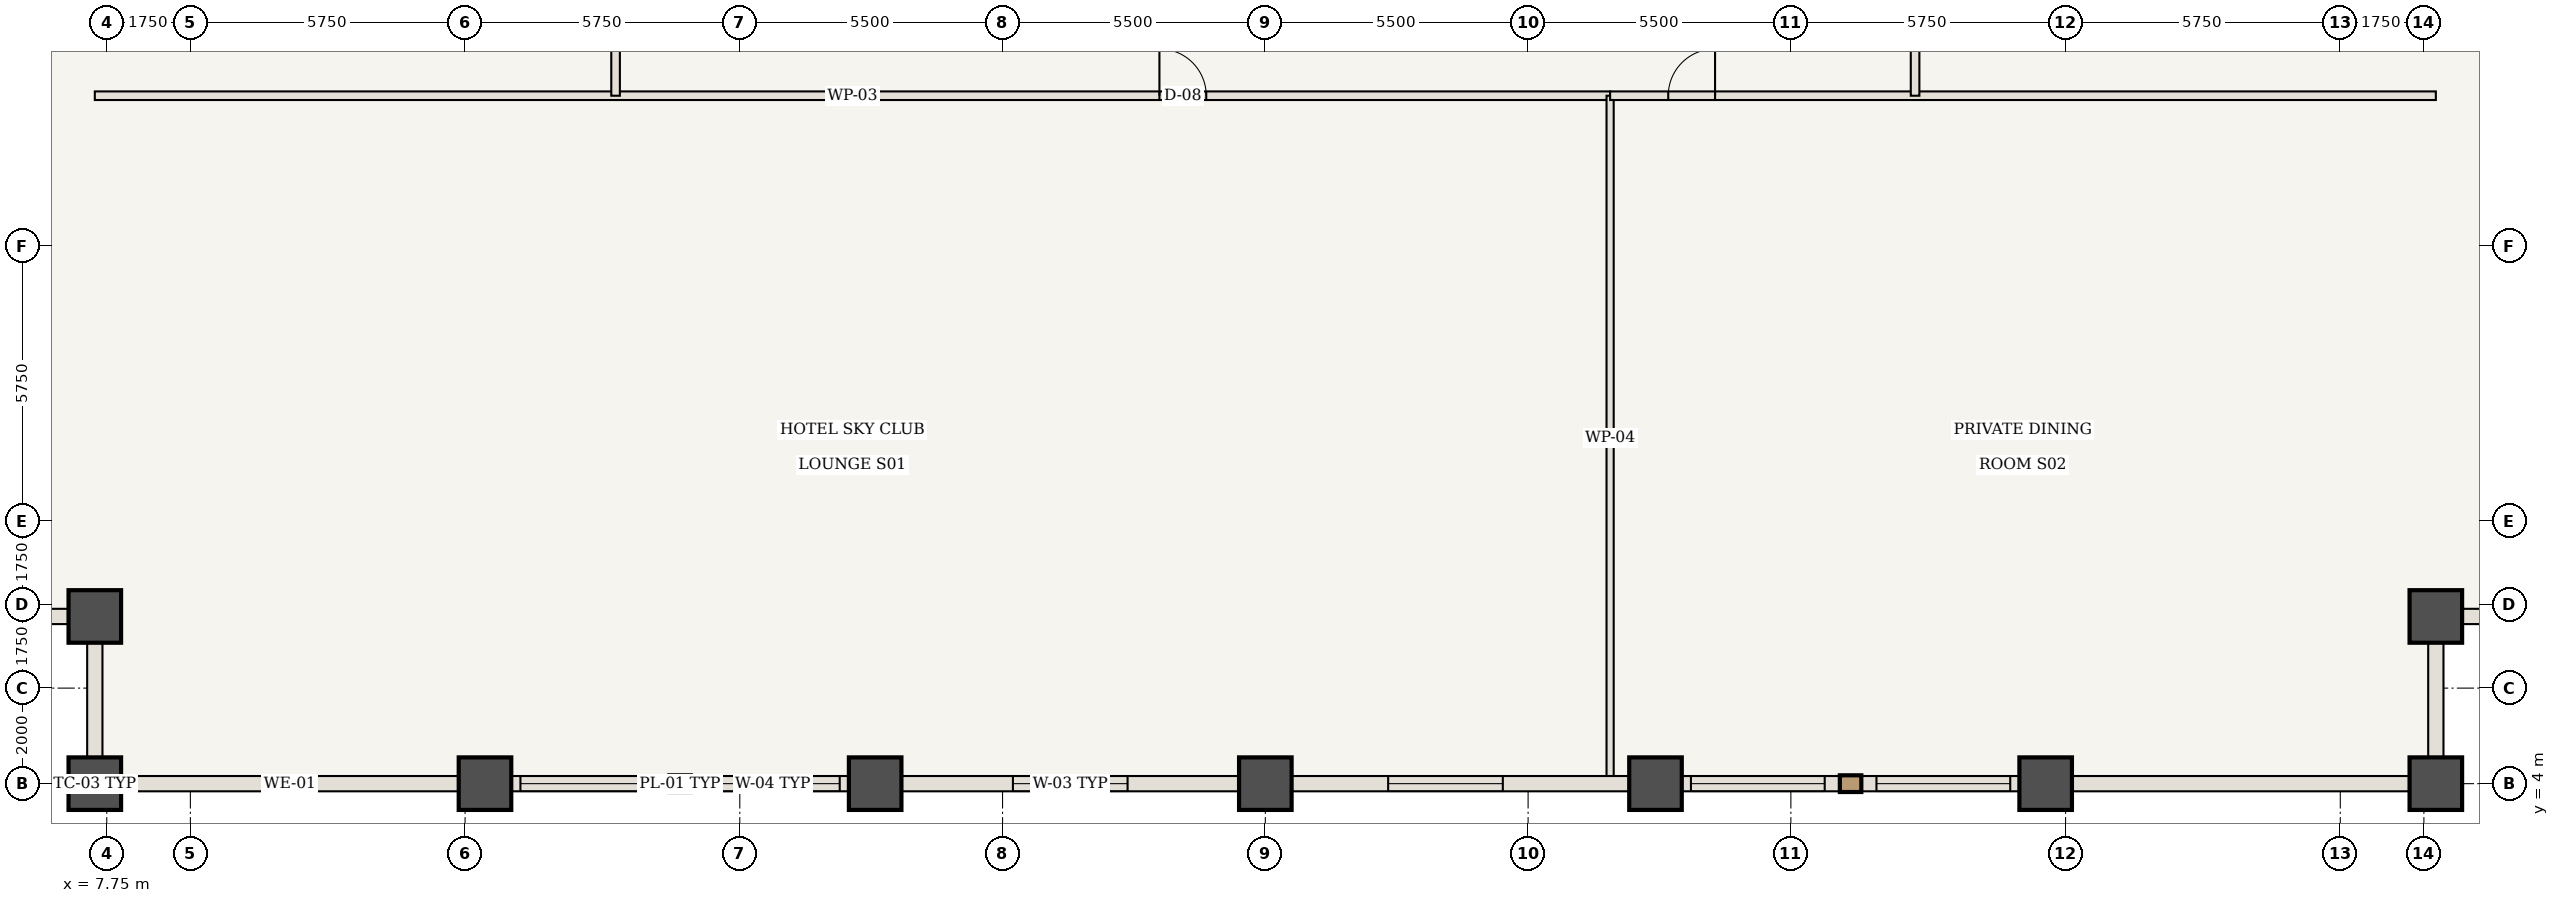
"""IFC4 building model, lengths in metres.
Left out: names, types, materials, properties, quantities, classifications, styles, units other than length and angle.
Written with IfcOpenShell. Run it as: python <this file> out.ifc"""

import sys

from ifc_helpers import new_model, si_unit, direction, frame, frame_2d, origin, origin_2d, place, context, subcontext, project, spatial, rectangle, extrude, element, fill, save


model = new_model("IFC4")
c1 = context("Model", 3, precision=1e-05, world=origin(), true_north=direction((0.0, 1.0)))
c2 = subcontext(c1, "Body", "Model", "MODEL_VIEW")
j1 = project(units=[si_unit("LENGTHUNIT", "METRE"), si_unit("PLANEANGLEUNIT", "RADIAN")], contexts=[c1])
p1 = place(None, origin())
s1 = spatial("IfcSite", under=j1, at=p1, CompositionType="ELEMENT")
p2 = place(p1, origin())
s2 = spatial("IfcBuilding", under=s1, at=p2, CompositionType="ELEMENT")
p3 = place(p2, frame((0.0, 0.0, 96.25)))
s3 = spatial("IfcBuildingStorey", under=s2, at=p3, CompositionType="ELEMENT", Elevation=96.25)
for number, where, z_axis, x_axis in (
    (1, (7.5, 4.0, 0.0), (0.0, 0.0, 1.0), (1.0, 0.0, 0.0)),
    (2, (7.5, 7.5, 0.0), (0.0, 0.0, 1.0), (1.0, 0.0, 0.0)),
    (3, (56.5, 4.0, 0.0), (0.0, 0.0, 1.0), (1.0, 0.0, 0.0)),
    (4, (56.5, 7.5, 0.0), (0.0, 0.0, 1.0), (1.0, 0.0, 0.0)),
    (5, (15.667, 4.0, 0.0), (0.0, 0.0, 1.0), (1.0, 0.0, 0.0)),
    (6, (23.833, 4.0, 0.0), (0.0, 0.0, 1.0), (1.0, 0.0, 0.0)),
    (7, (32.0, 4.0, 0.0), (0.0, 0.0, 1.0), (1.0, 0.0, 0.0)),
    (8, (40.167, 4.0, 0.0), (0.0, 0.0, 1.0), (1.0, 0.0, 0.0)),
    (9, (48.333, 4.0, 0.0), (0.0, 0.0, 1.0), (1.0, 0.0, 0.0)),
):
    element("IfcColumn", number, at=place(p3, frame(where, z_axis=z_axis, x_axis=x_axis)), inside=s3, PredefinedType="COLUMN", context=c2, shape_type="SweptSolid", body=[
        extrude(rectangle(XDim=1.1, YDim=1.1, at=origin_2d()), origin(), (0.0, 0.0, 1.0), 3.5),
    ])
p4 = place(p3, frame((7.5, 18.4, 0.0), z_axis=(0.0, 0.0, 1.0), x_axis=(1.0, 0.0, 0.0)))
e10 = element("IfcWall", 10, at=p4, inside=s3, PredefinedType="STANDARD", context=c2, shape_type="SweptSolid", body=[
    extrude(rectangle(XDim=31.717, YDim=0.18, at=frame_2d((15.858, 0.0))), origin(), (0.0, 0.0, 1.0), 3.08),
])
p5 = place(p4, frame((22.283, 0.0, 0.0)))
e11 = element("IfcOpeningElement", 11, at=p5, cuts=e10, PredefinedType="OPENING", context=c2, shape_type="SweptSolid", body=[
    extrude(rectangle(XDim=0.98, YDim=2.2, at=frame_2d((0.49, 1.1))), frame((0.0, 0.1, 0.0), z_axis=(0.0, -1.0, 0.0), x_axis=(1.0, 0.0, 0.0)), (0.0, 0.0, 1.0), 0.2),
])
p6 = place(p3, frame((39.217, 4.06, 0.0), z_axis=(0.0, 0.0, 1.0), x_axis=(0.0, 1.0, 0.0)))
e12 = element("IfcWall", 12, at=p6, inside=s3, PredefinedType="STANDARD", context=c2, shape_type="SweptSolid", body=[
    extrude(rectangle(XDim=14.34, YDim=0.15, at=frame_2d((7.17, 0.0))), origin(), (0.0, 0.0, 1.0), 3.08),
])
p7 = place(p3, frame((39.217, 18.4, 0.0), z_axis=(0.0, 0.0, 1.0), x_axis=(1.0, 0.0, 0.0)))
e13 = element("IfcWall", 13, at=p7, inside=s3, PredefinedType="STANDARD", context=c2, shape_type="SweptSolid", body=[
    extrude(rectangle(XDim=17.283, YDim=0.18, at=frame_2d((8.642, 0.0))), origin(), (0.0, 0.0, 1.0), 3.08),
])
p8 = place(p7, frame((1.217, 0.0, 0.0)))
e14 = element("IfcOpeningElement", 14, at=p8, cuts=e13, PredefinedType="OPENING", context=c2, shape_type="SweptSolid", body=[
    extrude(rectangle(XDim=0.98, YDim=2.2, at=frame_2d((0.49, 1.1))), frame((0.0, 0.1, 0.0), z_axis=(0.0, -1.0, 0.0), x_axis=(1.0, 0.0, 0.0)), (0.0, 0.0, 1.0), 0.2),
])
p9 = place(p3, frame((18.4, 18.4, 0.0), z_axis=(0.0, 0.0, 1.0), x_axis=(0.0, 1.0, 0.0)))
e15 = element("IfcWall", 15, at=p9, inside=s3, PredefinedType="STANDARD", context=c2, shape_type="SweptSolid", body=[
    extrude(rectangle(XDim=12.65, YDim=0.18, at=frame_2d((6.325, 0.0))), origin(), (0.0, 0.0, 1.0), 3.08),
])
p10 = place(p9, frame((5.825, 0.0, 0.0)))
e16 = element("IfcOpeningElement", 16, at=p10, cuts=e15, PredefinedType="OPENING", context=c2, shape_type="SweptSolid", body=[
    extrude(rectangle(XDim=0.98, YDim=2.2, at=frame_2d((0.49, 1.1))), frame((0.0, 0.1, 0.0), z_axis=(0.0, -1.0, 0.0), x_axis=(1.0, 0.0, 0.0)), (0.0, 0.0, 1.0), 0.2),
])
p11 = place(p3, frame((45.6, 18.4, 0.0), z_axis=(0.0, 0.0, 1.0), x_axis=(0.0, 1.0, 0.0)))
e17 = element("IfcWall", 17, at=p11, inside=s3, PredefinedType="STANDARD", context=c2, shape_type="SweptSolid", body=[
    extrude(rectangle(XDim=12.65, YDim=0.18, at=frame_2d((6.325, 0.0))), origin(), (0.0, 0.0, 1.0), 3.08),
])
p12 = place(p11, frame((5.825, 0.0, 0.0)))
e18 = element("IfcOpeningElement", 18, at=p12, cuts=e17, PredefinedType="OPENING", context=c2, shape_type="SweptSolid", body=[
    extrude(rectangle(XDim=0.98, YDim=2.2, at=frame_2d((0.49, 1.1))), frame((0.0, 0.1, 0.0), z_axis=(0.0, -1.0, 0.0), x_axis=(1.0, 0.0, 0.0)), (0.0, 0.0, 1.0), 0.2),
])
p13 = place(p3, frame((15.667, 4.0, 0.0), z_axis=(0.0, 0.0, 1.0), x_axis=(-1.0, 0.0, 0.0)))
e19 = element("IfcWall", 19, at=p13, inside=s3, PredefinedType="USERDEFINED", context=c2, shape_type="SweptSolid", body=[
    extrude(rectangle(XDim=8.167, YDim=0.32, at=frame_2d((4.083, 0.0))), origin(), (0.0, 0.0, 1.0), 2.28),
])
p14 = place(p3, frame((23.833, 4.0, 0.0), z_axis=(0.0, 0.0, 1.0), x_axis=(-1.0, 0.0, 0.0)))
e20 = element("IfcWall", 20, at=p14, inside=s3, PredefinedType="USERDEFINED", context=c2, shape_type="SweptSolid", body=[
    extrude(rectangle(XDim=8.167, YDim=0.32, at=frame_2d((4.083, 0.0))), origin(), (0.0, 0.0, 1.0), 2.28),
])
p15 = place(p14, frame((0.742, 0.0, 0.85)))
e21 = element("IfcOpeningElement", 21, at=p15, cuts=e20, PredefinedType="OPENING", context=c2, shape_type="SweptSolid", body=[
    extrude(rectangle(XDim=2.8, YDim=1.23, at=frame_2d((1.4, 0.615))), frame((0.0, 0.17, 0.0), z_axis=(0.0, -1.0, 0.0), x_axis=(1.0, 0.0, 0.0)), (0.0, 0.0, 1.0), 0.34),
])
p16 = place(p14, frame((4.625, 0.0, 0.85)))
e22 = element("IfcOpeningElement", 22, at=p16, cuts=e20, PredefinedType="OPENING", context=c2, shape_type="SweptSolid", body=[
    extrude(rectangle(XDim=2.8, YDim=1.23, at=frame_2d((1.4, 0.615))), frame((0.0, 0.17, 0.0), z_axis=(0.0, -1.0, 0.0), x_axis=(1.0, 0.0, 0.0)), (0.0, 0.0, 1.0), 0.34),
])
p17 = place(p3, frame((32.0, 4.0, 0.0), z_axis=(0.0, 0.0, 1.0), x_axis=(-1.0, 0.0, 0.0)))
e23 = element("IfcWall", 23, at=p17, inside=s3, PredefinedType="USERDEFINED", context=c2, shape_type="SweptSolid", body=[
    extrude(rectangle(XDim=8.167, YDim=0.32, at=frame_2d((4.083, 0.0))), origin(), (0.0, 0.0, 1.0), 2.28),
])
p18 = place(p17, frame((2.883, 0.0, 0.85)))
e24 = element("IfcOpeningElement", 24, at=p18, cuts=e23, PredefinedType="OPENING", context=c2, shape_type="SweptSolid", body=[
    extrude(rectangle(XDim=2.4, YDim=1.23, at=frame_2d((1.2, 0.615))), frame((0.0, 0.17, 0.0), z_axis=(0.0, -1.0, 0.0), x_axis=(1.0, 0.0, 0.0)), (0.0, 0.0, 1.0), 0.34),
])
p19 = place(p3, frame((40.167, 4.0, 0.0), z_axis=(0.0, 0.0, 1.0), x_axis=(-1.0, 0.0, 0.0)))
e25 = element("IfcWall", 25, at=p19, inside=s3, PredefinedType="USERDEFINED", context=c2, shape_type="SweptSolid", body=[
    extrude(rectangle(XDim=8.167, YDim=0.32, at=frame_2d((4.083, 0.0))), origin(), (0.0, 0.0, 1.0), 2.28),
])
p20 = place(p19, frame((3.196, 0.0, 0.85)))
e26 = element("IfcOpeningElement", 26, at=p20, cuts=e25, PredefinedType="OPENING", context=c2, shape_type="SweptSolid", body=[
    extrude(rectangle(XDim=2.4, YDim=1.23, at=frame_2d((1.2, 0.615))), frame((0.0, 0.17, 0.0), z_axis=(0.0, -1.0, 0.0), x_axis=(1.0, 0.0, 0.0)), (0.0, 0.0, 1.0), 0.34),
])
p21 = place(p3, frame((48.333, 4.0, 0.0), z_axis=(0.0, 0.0, 1.0), x_axis=(-1.0, 0.0, 0.0)))
e27 = element("IfcWall", 27, at=p21, inside=s3, PredefinedType="USERDEFINED", context=c2, shape_type="SweptSolid", body=[
    extrude(rectangle(XDim=8.167, YDim=0.32, at=frame_2d((4.083, 0.0))), origin(), (0.0, 0.0, 1.0), 2.28),
])
p22 = place(p21, frame((0.742, 0.0, 0.85)))
e28 = element("IfcOpeningElement", 28, at=p22, cuts=e27, PredefinedType="OPENING", context=c2, shape_type="SweptSolid", body=[
    extrude(rectangle(XDim=2.8, YDim=1.23, at=frame_2d((1.4, 0.615))), frame((0.0, 0.17, 0.0), z_axis=(0.0, -1.0, 0.0), x_axis=(1.0, 0.0, 0.0)), (0.0, 0.0, 1.0), 0.34),
])
p23 = place(p21, frame((4.625, 0.0, 0.85)))
e29 = element("IfcOpeningElement", 29, at=p23, cuts=e27, PredefinedType="OPENING", context=c2, shape_type="SweptSolid", body=[
    extrude(rectangle(XDim=2.8, YDim=1.23, at=frame_2d((1.4, 0.615))), frame((0.0, 0.17, 0.0), z_axis=(0.0, -1.0, 0.0), x_axis=(1.0, 0.0, 0.0)), (0.0, 0.0, 1.0), 0.34),
])
p24 = place(p3, frame((56.5, 4.0, 0.0), z_axis=(0.0, 0.0, 1.0), x_axis=(-1.0, 0.0, 0.0)))
e30 = element("IfcWall", 30, at=p24, inside=s3, PredefinedType="USERDEFINED", context=c2, shape_type="SweptSolid", body=[
    extrude(rectangle(XDim=8.167, YDim=0.32, at=frame_2d((4.083, 0.0))), origin(), (0.0, 0.0, 1.0), 2.28),
])
for number, where, z_axis, x_axis in (
    (31, (7.5, 4.0, 0.0), (0.0, 0.0, 1.0), (0.0, 1.0, 0.0)),
    (32, (7.5, 7.5, 0.0), (0.0, 0.0, 1.0), (-1.0, 0.0, 0.0)),
    (33, (56.5, 7.5, 0.0), (0.0, 0.0, 1.0), (0.0, -1.0, 0.0)),
    (34, (60.0, 7.5, 0.0), (0.0, 0.0, 1.0), (-1.0, 0.0, 0.0)),
):
    element("IfcWall", number, at=place(p3, frame(where, z_axis=z_axis, x_axis=x_axis)), inside=s3, PredefinedType="USERDEFINED", context=c2, shape_type="SweptSolid", body=[
        extrude(rectangle(XDim=3.5, YDim=0.32, at=frame_2d((1.75, 0.0))), origin(), (0.0, 0.0, 1.0), 2.28),
    ])
p25 = place(p5, origin())
e35 = element("IfcDoor", 35, at=p25, inside=s3, OperationType="SINGLE_SWING_LEFT", PredefinedType="DOOR", context=c2, shape_type="SweptSolid", body=[
    extrude(rectangle(XDim=0.98, YDim=2.2, at=frame_2d((0.49, 1.1))), frame((0.0, 0.025, 0.0), z_axis=(0.0, -1.0, 0.0), x_axis=(1.0, 0.0, 0.0)), (0.0, 0.0, 1.0), 0.05),
])
fill(e11, e35)
p26 = place(p8, origin())
e36 = element("IfcDoor", 36, at=p26, inside=s3, OperationType="SINGLE_SWING_RIGHT", PredefinedType="DOOR", context=c2, shape_type="SweptSolid", body=[
    extrude(rectangle(XDim=0.98, YDim=2.2, at=frame_2d((0.49, 1.1))), frame((0.0, 0.025, 0.0), z_axis=(0.0, -1.0, 0.0), x_axis=(1.0, 0.0, 0.0)), (0.0, 0.0, 1.0), 0.05),
])
fill(e14, e36)
p27 = place(p15, origin())
e37 = element("IfcWindow", 37, at=p27, inside=s3, PartitioningType="SINGLE_PANEL", PredefinedType="WINDOW", context=c2, shape_type="SweptSolid", body=[
    extrude(rectangle(XDim=2.8, YDim=1.23, at=frame_2d((1.4, 0.615))), frame((0.0, 0.03, 0.0), z_axis=(0.0, -1.0, 0.0), x_axis=(1.0, 0.0, 0.0)), (0.0, 0.0, 1.0), 0.06),
])
fill(e21, e37)
p28 = place(p16, origin())
e38 = element("IfcWindow", 38, at=p28, inside=s3, PartitioningType="SINGLE_PANEL", PredefinedType="WINDOW", context=c2, shape_type="SweptSolid", body=[
    extrude(rectangle(XDim=2.8, YDim=1.23, at=frame_2d((1.4, 0.615))), frame((0.0, 0.03, 0.0), z_axis=(0.0, -1.0, 0.0), x_axis=(1.0, 0.0, 0.0)), (0.0, 0.0, 1.0), 0.06),
])
fill(e22, e38)
p29 = place(p18, origin())
e39 = element("IfcWindow", 39, at=p29, inside=s3, PartitioningType="SINGLE_PANEL", PredefinedType="WINDOW", context=c2, shape_type="SweptSolid", body=[
    extrude(rectangle(XDim=2.4, YDim=1.23, at=frame_2d((1.2, 0.615))), frame((0.0, 0.03, 0.0), z_axis=(0.0, -1.0, 0.0), x_axis=(1.0, 0.0, 0.0)), (0.0, 0.0, 1.0), 0.06),
])
fill(e24, e39)
p30 = place(p20, origin())
e40 = element("IfcWindow", 40, at=p30, inside=s3, PartitioningType="SINGLE_PANEL", PredefinedType="WINDOW", context=c2, shape_type="SweptSolid", body=[
    extrude(rectangle(XDim=2.4, YDim=1.23, at=frame_2d((1.2, 0.615))), frame((0.0, 0.03, 0.0), z_axis=(0.0, -1.0, 0.0), x_axis=(1.0, 0.0, 0.0)), (0.0, 0.0, 1.0), 0.06),
])
fill(e26, e40)
p31 = place(p22, origin())
e41 = element("IfcWindow", 41, at=p31, inside=s3, PartitioningType="SINGLE_PANEL", PredefinedType="WINDOW", context=c2, shape_type="SweptSolid", body=[
    extrude(rectangle(XDim=2.8, YDim=1.23, at=frame_2d((1.4, 0.615))), frame((0.0, 0.03, 0.0), z_axis=(0.0, -1.0, 0.0), x_axis=(1.0, 0.0, 0.0)), (0.0, 0.0, 1.0), 0.06),
])
fill(e28, e41)
p32 = place(p23, origin())
e42 = element("IfcWindow", 42, at=p32, inside=s3, PartitioningType="SINGLE_PANEL", PredefinedType="WINDOW", context=c2, shape_type="SweptSolid", body=[
    extrude(rectangle(XDim=2.8, YDim=1.23, at=frame_2d((1.4, 0.615))), frame((0.0, 0.03, 0.0), z_axis=(0.0, -1.0, 0.0), x_axis=(1.0, 0.0, 0.0)), (0.0, 0.0, 1.0), 0.06),
])
fill(e29, e42)
save(model, sys.argv[1])
